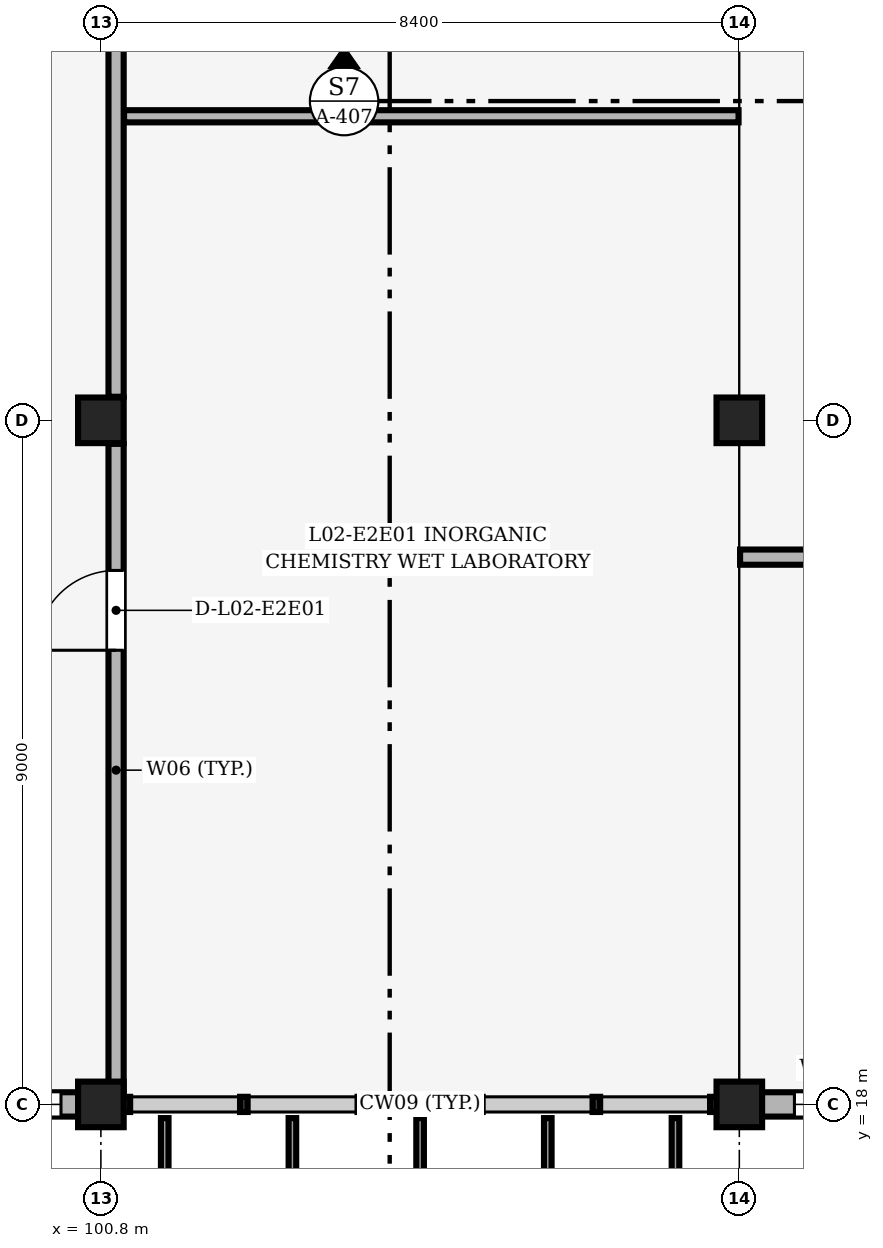
"""IFC4 building model, lengths in metres.
Left out: names, types, materials, properties, quantities, classifications, styles, units other than length and angle.
Written with IfcOpenShell. Run it as: python <this file> out.ifc"""

import sys

from ifc_helpers import new_model, si_unit, direction, frame, frame_2d, origin, origin_2d, place, context, subcontext, project, spatial, rectangle, extrude, element, fill, save


model = new_model("IFC4")
c1 = context("Model", 3, precision=1e-05, world=origin(), true_north=direction((0.0, 1.0)))
c2 = subcontext(c1, "Body", "Model", "MODEL_VIEW")
j1 = project(units=[si_unit("LENGTHUNIT", "METRE"), si_unit("PLANEANGLEUNIT", "RADIAN")], contexts=[c1])
p1 = place(None, origin())
s1 = spatial("IfcSite", under=j1, at=p1, CompositionType="ELEMENT")
p2 = place(p1, origin())
s2 = spatial("IfcBuilding", under=s1, at=p2, CompositionType="ELEMENT")
p3 = place(p2, frame((0.0, 0.0, 9.0)))
s3 = spatial("IfcBuildingStorey", under=s2, at=p3, CompositionType="ELEMENT", Elevation=9.0)
for number, where, z_axis, x_axis in (
    (1, (100.8, 18.0, 0.0), (0.0, 0.0, 1.0), (1.0, 0.0, 0.0)),
    (2, (100.8, 27.0, 0.0), (0.0, 0.0, 1.0), (1.0, 0.0, 0.0)),
    (3, (109.2, 18.0, 0.0), (0.0, 0.0, 1.0), (1.0, 0.0, 0.0)),
    (4, (109.2, 27.0, 0.0), (0.0, 0.0, 1.0), (1.0, 0.0, 0.0)),
):
    element("IfcColumn", number, at=place(p3, frame(where, z_axis=z_axis, x_axis=x_axis)), inside=s3, PredefinedType="COLUMN", context=c2, shape_type="SweptSolid", body=[
        extrude(rectangle(XDim=0.6, YDim=0.6, at=origin_2d()), origin(), (0.0, 0.0, 1.0), 4.2),
    ])
p4 = place(p3, frame((92.675, 18.0, 0.0), z_axis=(0.0, 0.0, 1.0), x_axis=(1.0, 0.0, 0.0)))
e5 = element("IfcWall", 5, at=p4, inside=s3, PredefinedType="SOLIDWALL", context=c2, shape_type="SweptSolid", body=[
    extrude(rectangle(XDim=7.85, YDim=0.32, at=frame_2d((3.925, 0.0))), origin(), (0.0, 0.0, 1.0), 3.18),
])
p5 = place(p4, frame((0.45, 0.0, 0.9)))
e6 = element("IfcOpeningElement", 6, at=p5, cuts=e5, PredefinedType="OPENING", context=c2, shape_type="SweptSolid", body=[
    extrude(rectangle(XDim=1.2, YDim=1.8, at=frame_2d((0.6, 0.9))), frame((0.0, 0.17, 0.0), z_axis=(0.0, -1.0, 0.0), x_axis=(1.0, 0.0, 0.0)), (0.0, 0.0, 1.0), 0.34),
])
p6 = place(p4, frame((5.92, 0.0, 0.9)))
e7 = element("IfcOpeningElement", 7, at=p6, cuts=e5, PredefinedType="OPENING", context=c2, shape_type="SweptSolid", body=[
    extrude(rectangle(XDim=1.68, YDim=2.13, at=frame_2d((0.84, 1.065))), frame((0.0, 0.17, 0.0), z_axis=(0.0, -1.0, 0.0), x_axis=(1.0, 0.0, 0.0)), (0.0, 0.0, 1.0), 0.34),
])
p7 = place(p3, frame((109.475, 18.0, 0.0), z_axis=(0.0, 0.0, 1.0), x_axis=(1.0, 0.0, 0.0)))
e8 = element("IfcWall", 8, at=p7, inside=s3, PredefinedType="SOLIDWALL", context=c2, shape_type="SweptSolid", body=[
    extrude(rectangle(XDim=7.875, YDim=0.32, at=frame_2d((3.938, 0.0))), origin(), (0.0, 0.0, 1.0), 3.43),
])
p8 = place(p7, frame((0.45, 0.0, 0.9)))
e9 = element("IfcOpeningElement", 9, at=p8, cuts=e8, PredefinedType="OPENING", context=c2, shape_type="SweptSolid", body=[
    extrude(rectangle(XDim=1.2, YDim=1.5, at=frame_2d((0.6, 0.75))), frame((0.0, 0.17, 0.0), z_axis=(0.0, -1.0, 0.0), x_axis=(1.0, 0.0, 0.0)), (0.0, 0.0, 1.0), 0.34),
])
p9 = place(p7, frame((6.225, 0.0, 0.9)))
e10 = element("IfcOpeningElement", 10, at=p9, cuts=e8, PredefinedType="OPENING", context=c2, shape_type="SweptSolid", body=[
    extrude(rectangle(XDim=1.2, YDim=1.8, at=frame_2d((0.6, 0.9))), frame((0.0, 0.17, 0.0), z_axis=(0.0, -1.0, 0.0), x_axis=(1.0, 0.0, 0.0)), (0.0, 0.0, 1.0), 0.34),
])
p10 = place(p3, frame((101.105, 31.0, 0.0), z_axis=(0.0, 0.0, 1.0), x_axis=(1.0, 0.0, 0.0)))
e11 = element("IfcWall", 11, at=p10, inside=s3, PredefinedType="PARTITIONING", context=c2, shape_type="SweptSolid", body=[
    extrude(rectangle(XDim=8.085, YDim=0.16, at=frame_2d((4.042, 0.0))), origin(), (0.0, 0.0, 1.0), 3.9),
])
p11 = place(p3, frame((101.0, 18.105, 0.0), z_axis=(0.0, 0.0, 1.0), x_axis=(0.0, 1.0, 0.0)))
e12 = element("IfcWall", 12, at=p11, inside=s3, PredefinedType="PARTITIONING", context=c2, shape_type="SweptSolid", body=[
    extrude(rectangle(XDim=8.585, YDim=0.2, at=frame_2d((4.292, 0.0))), origin(), (0.0, 0.0, 1.0), 3.18),
])
p12 = place(p11, frame((5.87, 0.0, 0.0)))
e13 = element("IfcOpeningElement", 13, at=p12, cuts=e12, PredefinedType="OPENING", context=c2, shape_type="SweptSolid", body=[
    extrude(rectangle(XDim=1.05, YDim=2.2, at=frame_2d((0.525, 1.1))), frame((0.0, 0.11, 0.0), z_axis=(0.0, -1.0, 0.0), x_axis=(1.0, 0.0, 0.0)), (0.0, 0.0, 1.0), 0.22),
])
p13 = place(p3, frame((101.0, 27.31, 0.0), z_axis=(0.0, 0.0, 1.0), x_axis=(0.0, 1.0, 0.0)))
e14 = element("IfcWall", 14, at=p13, inside=s3, PredefinedType="PARTITIONING", context=c2, shape_type="SweptSolid", body=[
    extrude(rectangle(XDim=7.78, YDim=0.2, at=frame_2d((3.89, 0.0))), origin(), (0.0, 0.0, 1.0), 3.13),
])
p14 = place(p3, frame((109.21, 25.2, 0.0), z_axis=(0.0, 0.0, 1.0), x_axis=(1.0, 0.0, 0.0)))
e15 = element("IfcWall", 15, at=p14, inside=s3, PredefinedType="PARTITIONING", context=c2, shape_type="SweptSolid", body=[
    extrude(rectangle(XDim=25.025, YDim=0.2, at=frame_2d((12.513, 0.0))), origin(), (0.0, 0.0, 1.0), 3.9),
])
p15 = place(p14, frame((6.74, 0.0, 0.0)))
e16 = element("IfcOpeningElement", 16, at=p15, cuts=e15, PredefinedType="OPENING", context=c2, shape_type="SweptSolid", body=[
    extrude(rectangle(XDim=0.9, YDim=2.1, at=frame_2d((0.45, 1.05))), frame((0.0, 0.11, 0.0), z_axis=(0.0, -1.0, 0.0), x_axis=(1.0, 0.0, 0.0)), (0.0, 0.0, 1.0), 0.22),
])
p16 = place(p14, frame((19.34, 0.0, 0.0)))
e17 = element("IfcOpeningElement", 17, at=p16, cuts=e15, PredefinedType="OPENING", context=c2, shape_type="SweptSolid", body=[
    extrude(rectangle(XDim=0.9, YDim=2.1, at=frame_2d((0.45, 1.05))), frame((0.0, 0.11, 0.0), z_axis=(0.0, -1.0, 0.0), x_axis=(1.0, 0.0, 0.0)), (0.0, 0.0, 1.0), 0.22),
])
p17 = place(p6, origin())
e18 = element("IfcWindow", 18, at=p17, inside=s3, PartitioningType="SINGLE_PANEL", PredefinedType="WINDOW", context=c2, shape_type="SweptSolid", body=[
    extrude(rectangle(XDim=1.68, YDim=2.13, at=frame_2d((0.84, 1.065))), frame((0.0, 0.03, 0.0), z_axis=(0.0, -1.0, 0.0), x_axis=(1.0, 0.0, 0.0)), (0.0, 0.0, 1.0), 0.06),
])
fill(e7, e18)
p18 = place(p8, origin())
e19 = element("IfcWindow", 19, at=p18, inside=s3, PartitioningType="SINGLE_PANEL", PredefinedType="WINDOW", context=c2, shape_type="SweptSolid", body=[
    extrude(rectangle(XDim=1.2, YDim=1.5, at=frame_2d((0.6, 0.75))), frame((0.0, 0.03, 0.0), z_axis=(0.0, -1.0, 0.0), x_axis=(1.0, 0.0, 0.0)), (0.0, 0.0, 1.0), 0.06),
])
fill(e9, e19)
p19 = place(p12, origin())
e20 = element("IfcDoor", 20, at=p19, inside=s3, OperationType="SINGLE_SWING_LEFT", PredefinedType="DOOR", context=c2, shape_type="SweptSolid", body=[
    extrude(rectangle(XDim=1.05, YDim=2.2, at=frame_2d((0.525, 1.1))), frame((0.0, 0.025, 0.0), z_axis=(0.0, -1.0, 0.0), x_axis=(1.0, 0.0, 0.0)), (0.0, 0.0, 1.0), 0.05),
])
fill(e13, e20)
save(model, sys.argv[1])
